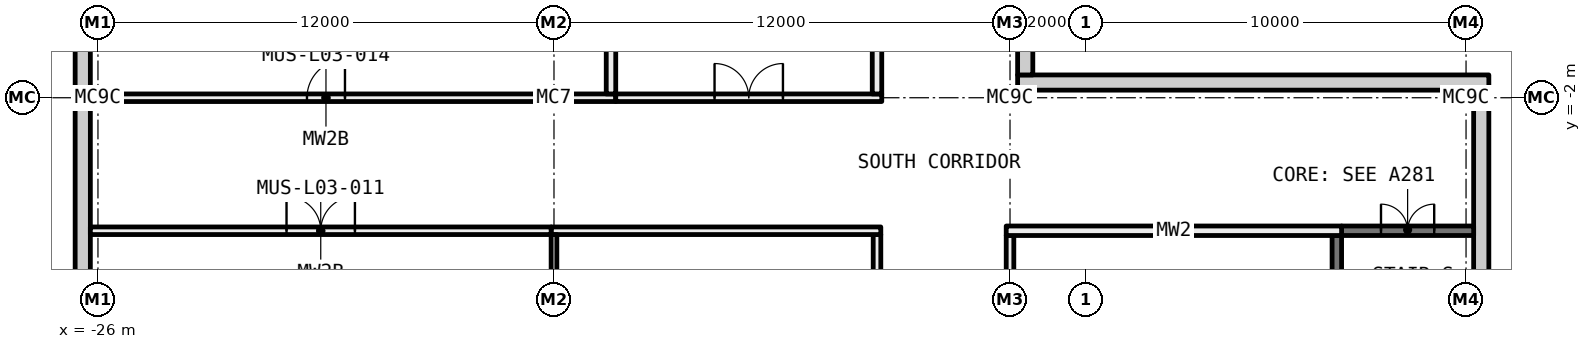
"""IFC4 building model, lengths in metres.
Left out: names, types, materials, properties, quantities, classifications, styles, units other than length and angle.
Written with IfcOpenShell. Run it as: python <this file> out.ifc"""

import sys

from ifc_helpers import new_model, si_unit, direction, frame, frame_2d, origin, origin_2d, place, context, subcontext, project, spatial, rectangle, i_section, extrude, element, fill, save


model = new_model("IFC4")
c1 = context("Model", 3, precision=1e-05, world=origin(), true_north=direction((0.0, 1.0)))
c2 = subcontext(c1, "Body", "Model", "MODEL_VIEW")
j1 = project(units=[si_unit("LENGTHUNIT", "METRE"), si_unit("PLANEANGLEUNIT", "RADIAN")], contexts=[c1])
p1 = place(None, origin())
s1 = spatial("IfcSite", under=j1, at=p1, CompositionType="ELEMENT")
p2 = place(p1, origin())
s2 = spatial("IfcBuilding", under=s1, at=p2, CompositionType="ELEMENT")
p3 = place(p2, frame((0.0, 0.0, 18.0)))
s3 = spatial("IfcBuildingStorey", under=s2, at=p3, CompositionType="ELEMENT", Elevation=18.0)
p4 = place(p3, frame((-26.0, -2.0, 0.0), z_axis=(0.0, 0.0, 1.0), x_axis=(1.0, 0.0, 0.0)))
e1 = element("IfcColumn", 1, at=p4, inside=s3, PredefinedType="COLUMN", context=c2, shape_type="SweptSolid", body=[
    extrude(i_section(OverallWidth=0.4, OverallDepth=0.4, WebThickness=0.013, FlangeThickness=0.021, FilletRadius=0.022, at=origin_2d()), origin(), (0.0, 0.0, 1.0), 5.6),
])
p5 = place(p3, frame((-14.0, -2.0, 0.0), z_axis=(0.0, 0.0, 1.0), x_axis=(1.0, 0.0, 0.0)))
e2 = element("IfcColumn", 2, at=p5, inside=s3, PredefinedType="COLUMN", context=c2, shape_type="SweptSolid", body=[
    extrude(i_section(OverallWidth=0.35, OverallDepth=0.35, WebThickness=0.012, FlangeThickness=0.019, FilletRadius=0.013, at=origin_2d()), origin(), (0.0, 0.0, 1.0), 5.6),
])
for number, where, z_axis, x_axis in (
    (3, (-2.0, -2.0, 0.0), (0.0, 0.0, 1.0), (1.0, 0.0, 0.0)),
    (4, (10.0, -2.0, 0.0), (0.0, 0.0, 1.0), (1.0, 0.0, 0.0)),
):
    element("IfcColumn", number, at=place(p3, frame(where, z_axis=z_axis, x_axis=x_axis)), inside=s3, PredefinedType="COLUMN", context=c2, shape_type="SweptSolid", body=[
        extrude(i_section(OverallWidth=0.4, OverallDepth=0.4, WebThickness=0.013, FlangeThickness=0.021, FilletRadius=0.022, at=origin_2d()), origin(), (0.0, 0.0, 1.0), 5.6),
    ])
p6 = place(p3, frame((-5.5, -14.875, 0.0), z_axis=(0.0, 0.0, 1.0), x_axis=(0.0, 1.0, 0.0)))
e5 = element("IfcWall", 5, at=p6, inside=s3, PredefinedType="PARTITIONING", context=c2, shape_type="SweptSolid", body=[
    extrude(rectangle(XDim=9.275, YDim=0.2, at=frame_2d((4.637, 0.0))), origin(), (0.0, 0.0, 1.0), 5.6),
])
p7 = place(p6, frame((3.738, 0.0, 0.0)))
e6 = element("IfcOpeningElement", 6, at=p7, cuts=e5, PredefinedType="OPENING", context=c2, shape_type="SweptSolid", body=[
    extrude(rectangle(XDim=1.8, YDim=2.1, at=frame_2d((0.9, 1.05))), frame((0.0, 0.11, 0.0), z_axis=(0.0, -1.0, 0.0), x_axis=(1.0, 0.0, 0.0)), (0.0, 0.0, 1.0), 0.22),
])
p8 = place(p3, frame((-14.075, -5.5, 0.0), z_axis=(0.0, 0.0, 1.0), x_axis=(1.0, 0.0, 0.0)))
e7 = element("IfcWall", 7, at=p8, inside=s3, PredefinedType="PARTITIONING", context=c2, shape_type="SweptSolid", body=[
    extrude(rectangle(XDim=8.675, YDim=0.2, at=frame_2d((4.337, 0.0))), origin(), (0.0, 0.0, 1.0), 5.6),
])
p9 = place(p3, frame((-25.8, -2.0, 0.0), z_axis=(0.0, 0.0, 1.0), x_axis=(1.0, 0.0, 0.0)))
e8 = element("IfcWall", 8, at=p9, inside=s3, PredefinedType="PARTITIONING", context=c2, shape_type="SweptSolid", body=[
    extrude(rectangle(XDim=11.6, YDim=0.2, at=frame_2d((5.8, 0.0))), origin(), (0.0, 0.0, 1.0), 5.112),
])
p10 = place(p9, frame((5.3, 0.0, 0.0)))
e9 = element("IfcOpeningElement", 9, at=p10, cuts=e8, PredefinedType="OPENING", context=c2, shape_type="SweptSolid", body=[
    extrude(rectangle(XDim=1.0, YDim=2.1, at=frame_2d((0.5, 1.05))), frame((0.0, 0.11, 0.0), z_axis=(0.0, -1.0, 0.0), x_axis=(1.0, 0.0, 0.0)), (0.0, 0.0, 1.0), 0.22),
])
p11 = place(p3, frame((-13.8, -2.0, 0.0), z_axis=(0.0, 0.0, 1.0), x_axis=(1.0, 0.0, 0.0)))
e10 = element("IfcWall", 10, at=p11, inside=s3, PredefinedType="PARTITIONING", context=c2, shape_type="SweptSolid", body=[
    extrude(rectangle(XDim=1.425, YDim=0.2, at=frame_2d((0.712, 0.0))), origin(), (0.0, 0.0, 1.0), 5.112),
])
p12 = place(p3, frame((-26.2, -5.5, 0.0), z_axis=(0.0, 0.0, 1.0), x_axis=(1.0, 0.0, 0.0)))
e11 = element("IfcWall", 11, at=p12, inside=s3, PredefinedType="PARTITIONING", context=c2, shape_type="SweptSolid", body=[
    extrude(rectangle(XDim=12.125, YDim=0.2, at=frame_2d((6.062, 0.0))), origin(), (0.0, 0.0, 1.0), 5.6),
])
p13 = place(p12, frame((5.162, 0.0, 0.0)))
e12 = element("IfcOpeningElement", 12, at=p13, cuts=e11, PredefinedType="OPENING", context=c2, shape_type="SweptSolid", body=[
    extrude(rectangle(XDim=1.8, YDim=2.1, at=frame_2d((0.9, 1.05))), frame((0.0, 0.11, 0.0), z_axis=(0.0, -1.0, 0.0), x_axis=(1.0, 0.0, 0.0)), (0.0, 0.0, 1.0), 0.22),
])
p14 = place(p3, frame((-12.375, -2.0, 0.0), z_axis=(0.0, 0.0, 1.0), x_axis=(1.0, 0.0, 0.0)))
e13 = element("IfcWall", 13, at=p14, inside=s3, PredefinedType="PARTITIONING", context=c2, shape_type="SweptSolid", body=[
    extrude(rectangle(XDim=7.0, YDim=0.2, at=frame_2d((3.5, 0.0))), origin(), (0.0, 0.0, 1.0), 5.112),
])
p15 = place(p14, frame((2.6, 0.0, 0.0)))
e14 = element("IfcOpeningElement", 14, at=p15, cuts=e13, PredefinedType="OPENING", context=c2, shape_type="SweptSolid", body=[
    extrude(rectangle(XDim=1.8, YDim=2.1, at=frame_2d((0.9, 1.05))), frame((0.0, 0.11, 0.0), z_axis=(0.0, -1.0, 0.0), x_axis=(1.0, 0.0, 0.0)), (0.0, 0.0, 1.0), 0.22),
])
p16 = place(p3, frame((-5.5, -1.9, 0.0), z_axis=(0.0, 0.0, 1.0), x_axis=(0.0, 1.0, 0.0)))
e15 = element("IfcWall", 15, at=p16, inside=s3, PredefinedType="PARTITIONING", context=c2, shape_type="SweptSolid", body=[
    extrude(rectangle(XDim=2.975, YDim=0.25, at=frame_2d((1.487, 0.0))), origin(), (0.0, 0.0, 1.0), 5.6),
])
p17 = place(p3, frame((-2.0, -13.8, 0.0), z_axis=(0.0, 0.0, 1.0), x_axis=(0.0, 1.0, 0.0)))
e16 = element("IfcWall", 16, at=p17, inside=s3, PredefinedType="PARTITIONING", context=c2, shape_type="SweptSolid", body=[
    extrude(rectangle(XDim=8.175, YDim=0.2, at=frame_2d((4.087, 0.0))), origin(), (0.0, 0.0, 1.0), 5.112),
])
p18 = place(p17, frame((3.588, 0.0, 0.0)))
e17 = element("IfcOpeningElement", 17, at=p18, cuts=e16, PredefinedType="OPENING", context=c2, shape_type="SweptSolid", body=[
    extrude(rectangle(XDim=1.0, YDim=2.1, at=frame_2d((0.5, 1.05))), frame((0.0, 0.11, 0.0), z_axis=(0.0, -1.0, 0.0), x_axis=(1.0, 0.0, 0.0)), (0.0, 0.0, 1.0), 0.22),
])
p19 = place(p3, frame((-2.1, -5.5, 0.0), z_axis=(0.0, 0.0, 1.0), x_axis=(1.0, 0.0, 0.0)))
e18 = element("IfcWall", 18, at=p19, inside=s3, PredefinedType="PARTITIONING", context=c2, shape_type="SweptSolid", body=[
    extrude(rectangle(XDim=8.825, YDim=0.25, at=frame_2d((4.413, 0.0))), origin(), (0.0, 0.0, 1.0), 5.6),
])
p20 = place(p3, frame((6.725, -5.5, 0.0), z_axis=(0.0, 0.0, 1.0), x_axis=(1.0, 0.0, 0.0)))
e19 = element("IfcWall", 19, at=p20, inside=s3, PredefinedType="SHEAR", context=c2, shape_type="SweptSolid", body=[
    extrude(rectangle(XDim=3.475, YDim=0.25, at=frame_2d((1.737, 0.0))), origin(), (0.0, 0.0, 1.0), 5.6),
])
p21 = place(p20, frame((1.037, 0.0, 0.0)))
e20 = element("IfcOpeningElement", 20, at=p21, cuts=e19, PredefinedType="OPENING", context=c2, shape_type="SweptSolid", body=[
    extrude(rectangle(XDim=1.4, YDim=2.1, at=frame_2d((0.7, 1.05))), frame((0.0, 0.135, 0.0), z_axis=(0.0, -1.0, 0.0), x_axis=(1.0, 0.0, 0.0)), (0.0, 0.0, 1.0), 0.27),
])
p22 = place(p3, frame((-14.0, -13.8, 0.0), z_axis=(0.0, 0.0, 1.0), x_axis=(0.0, 1.0, 0.0)))
e21 = element("IfcWall", 21, at=p22, inside=s3, PredefinedType="PARTITIONING", context=c2, shape_type="SweptSolid", body=[
    extrude(rectangle(XDim=8.2, YDim=0.15, at=frame_2d((4.1, 0.0))), origin(), (0.0, 0.0, 1.0), 5.112),
])
p23 = place(p3, frame((-12.5, -1.9, 0.0), z_axis=(0.0, 0.0, 1.0), x_axis=(0.0, 1.0, 0.0)))
e22 = element("IfcWall", 22, at=p23, inside=s3, PredefinedType="PARTITIONING", context=c2, shape_type="SweptSolid", body=[
    extrude(rectangle(XDim=2.975, YDim=0.25, at=frame_2d((1.487, 0.0))), origin(), (0.0, 0.0, 1.0), 5.6),
])
p24 = place(p3, frame((6.6, -14.875, 0.0), z_axis=(0.0, 0.0, 1.0), x_axis=(0.0, 1.0, 0.0)))
e23 = element("IfcWall", 23, at=p24, inside=s3, PredefinedType="SHEAR", context=c2, shape_type="SweptSolid", body=[
    extrude(rectangle(XDim=9.25, YDim=0.25, at=frame_2d((4.625, 0.0))), origin(), (0.0, 0.0, 1.0), 5.6),
])
p25 = place(p3, frame((-26.4, -26.2, -0.4), z_axis=(0.0, 0.0, 1.0), x_axis=(0.0, 1.0, 0.0)))
e24 = element("IfcWall", 24, at=p25, inside=s3, PredefinedType="STANDARD", context=c2, shape_type="SweptSolid", body=[
    extrude(rectangle(XDim=72.4, YDim=0.4, at=frame_2d((36.2, 0.0))), origin(), (0.0, 0.0, 1.0), 6.0),
])
p26 = place(p25, frame((27.7, 0.0, 1.3)))
e25 = element("IfcOpeningElement", 25, at=p26, cuts=e24, PredefinedType="OPENING", context=c2, shape_type="SweptSolid", body=[
    extrude(rectangle(XDim=2.0, YDim=3.6, at=frame_2d((1.0, 1.8))), frame((0.0, 0.21, 0.0), z_axis=(0.0, -1.0, 0.0), x_axis=(1.0, 0.0, 0.0)), (0.0, 0.0, 1.0), 0.42),
])
p27 = place(p25, frame((30.7, 0.0, 1.3)))
e26 = element("IfcOpeningElement", 26, at=p27, cuts=e24, PredefinedType="OPENING", context=c2, shape_type="SweptSolid", body=[
    extrude(rectangle(XDim=2.0, YDim=3.6, at=frame_2d((1.0, 1.8))), frame((0.0, 0.21, 0.0), z_axis=(0.0, -1.0, 0.0), x_axis=(1.0, 0.0, 0.0)), (0.0, 0.0, 1.0), 0.42),
])
p28 = place(p25, frame((33.2, 0.0, 1.3)))
e27 = element("IfcOpeningElement", 27, at=p28, cuts=e24, PredefinedType="OPENING", context=c2, shape_type="SweptSolid", body=[
    extrude(rectangle(XDim=2.0, YDim=3.6, at=frame_2d((1.0, 1.8))), frame((0.0, 0.21, 0.0), z_axis=(0.0, -1.0, 0.0), x_axis=(1.0, 0.0, 0.0)), (0.0, 0.0, 1.0), 0.42),
])
p29 = place(p25, frame((39.7, 0.0, 1.3)))
e28 = element("IfcOpeningElement", 28, at=p29, cuts=e24, PredefinedType="OPENING", context=c2, shape_type="SweptSolid", body=[
    extrude(rectangle(XDim=2.0, YDim=3.6, at=frame_2d((1.0, 1.8))), frame((0.0, 0.21, 0.0), z_axis=(0.0, -1.0, 0.0), x_axis=(1.0, 0.0, 0.0)), (0.0, 0.0, 1.0), 0.42),
])
p30 = place(p25, frame((42.7, 0.0, 1.3)))
e29 = element("IfcOpeningElement", 29, at=p30, cuts=e24, PredefinedType="OPENING", context=c2, shape_type="SweptSolid", body=[
    extrude(rectangle(XDim=2.0, YDim=3.6, at=frame_2d((1.0, 1.8))), frame((0.0, 0.21, 0.0), z_axis=(0.0, -1.0, 0.0), x_axis=(1.0, 0.0, 0.0)), (0.0, 0.0, 1.0), 0.42),
])
p31 = place(p25, frame((49.7, 0.0, 1.3)))
e30 = element("IfcOpeningElement", 30, at=p31, cuts=e24, PredefinedType="OPENING", context=c2, shape_type="SweptSolid", body=[
    extrude(rectangle(XDim=2.0, YDim=3.6, at=frame_2d((1.0, 1.8))), frame((0.0, 0.21, 0.0), z_axis=(0.0, -1.0, 0.0), x_axis=(1.0, 0.0, 0.0)), (0.0, 0.0, 1.0), 0.42),
])
p32 = place(p25, frame((53.7, 0.0, 1.3)))
e31 = element("IfcOpeningElement", 31, at=p32, cuts=e24, PredefinedType="OPENING", context=c2, shape_type="SweptSolid", body=[
    extrude(rectangle(XDim=2.0, YDim=3.6, at=frame_2d((1.0, 1.8))), frame((0.0, 0.21, 0.0), z_axis=(0.0, -1.0, 0.0), x_axis=(1.0, 0.0, 0.0)), (0.0, 0.0, 1.0), 0.42),
])
p33 = place(p25, frame((56.7, 0.0, 1.3)))
e32 = element("IfcOpeningElement", 32, at=p33, cuts=e24, PredefinedType="OPENING", context=c2, shape_type="SweptSolid", body=[
    extrude(rectangle(XDim=2.0, YDim=3.6, at=frame_2d((1.0, 1.8))), frame((0.0, 0.21, 0.0), z_axis=(0.0, -1.0, 0.0), x_axis=(1.0, 0.0, 0.0)), (0.0, 0.0, 1.0), 0.42),
])
p34 = place(p25, frame((62.2, 0.0, 1.3)))
e33 = element("IfcOpeningElement", 33, at=p34, cuts=e24, PredefinedType="OPENING", context=c2, shape_type="SweptSolid", body=[
    extrude(rectangle(XDim=2.0, YDim=3.6, at=frame_2d((1.0, 1.8))), frame((0.0, 0.21, 0.0), z_axis=(0.0, -1.0, 0.0), x_axis=(1.0, 0.0, 0.0)), (0.0, 0.0, 1.0), 0.42),
])
p35 = place(p25, frame((65.7, 0.0, 1.3)))
e34 = element("IfcOpeningElement", 34, at=p35, cuts=e24, PredefinedType="OPENING", context=c2, shape_type="SweptSolid", body=[
    extrude(rectangle(XDim=2.0, YDim=3.6, at=frame_2d((1.0, 1.8))), frame((0.0, 0.21, 0.0), z_axis=(0.0, -1.0, 0.0), x_axis=(1.0, 0.0, 0.0)), (0.0, 0.0, 1.0), 0.42),
])
p36 = place(p3, frame((10.4, -15.0, -0.4), z_axis=(0.0, 0.0, 1.0), x_axis=(0.0, 1.0, 0.0)))
e35 = element("IfcWall", 35, at=p36, inside=s3, PredefinedType="STANDARD", context=c2, shape_type="SweptSolid", body=[
    extrude(rectangle(XDim=13.2, YDim=0.4, at=frame_2d((6.6, 0.0))), origin(), (0.0, 0.0, 1.0), 6.0),
])
p37 = place(p3, frame((-1.8, -1.6, -0.4), z_axis=(0.0, 0.0, 1.0), x_axis=(1.0, 0.0, 0.0)))
e36 = element("IfcWall", 36, at=p37, inside=s3, PredefinedType="STANDARD", context=c2, shape_type="SweptSolid", body=[
    extrude(rectangle(XDim=12.4, YDim=0.4, at=frame_2d((6.2, 0.0))), origin(), (0.0, 0.0, 1.0), 6.0),
])
p38 = place(p3, frame((-1.6, -1.4, -0.4), z_axis=(0.0, 0.0, 1.0), x_axis=(0.0, 1.0, 0.0)))
e37 = element("IfcWall", 37, at=p38, inside=s3, PredefinedType="STANDARD", context=c2, shape_type="SweptSolid", body=[
    extrude(rectangle(XDim=47.6, YDim=0.4, at=frame_2d((23.8, 0.0))), origin(), (0.0, 0.0, 1.0), 6.0),
])
p39 = place(p21, origin())
e38 = element("IfcDoor", 38, at=p39, inside=s3, OperationType="DOUBLE_DOOR_SINGLE_SWING", PredefinedType="DOOR", context=c2, shape_type="SweptSolid", body=[
    extrude(rectangle(XDim=1.4, YDim=2.1, at=frame_2d((0.7, 1.05))), frame((0.0, 0.025, 0.0), z_axis=(0.0, -1.0, 0.0), x_axis=(1.0, 0.0, 0.0)), (0.0, 0.0, 1.0), 0.05),
])
fill(e20, e38)
p40 = place(p15, origin())
e39 = element("IfcDoor", 39, at=p40, inside=s3, OperationType="DOUBLE_DOOR_SINGLE_SWING", PredefinedType="DOOR", context=c2, shape_type="SweptSolid", body=[
    extrude(rectangle(XDim=1.8, YDim=2.1, at=frame_2d((0.9, 1.05))), frame((0.0, 0.025, 0.0), z_axis=(0.0, -1.0, 0.0), x_axis=(1.0, 0.0, 0.0)), (0.0, 0.0, 1.0), 0.05),
])
fill(e14, e39)
p41 = place(p13, origin())
e40 = element("IfcDoor", 40, at=p41, inside=s3, OperationType="DOUBLE_DOOR_SINGLE_SWING", PredefinedType="DOOR", context=c2, shape_type="SweptSolid", body=[
    extrude(rectangle(XDim=1.8, YDim=2.1, at=frame_2d((0.9, 1.05))), frame((0.0, 0.025, 0.0), z_axis=(0.0, -1.0, 0.0), x_axis=(1.0, 0.0, 0.0)), (0.0, 0.0, 1.0), 0.05),
])
fill(e12, e40)
p42 = place(p10, origin())
e41 = element("IfcDoor", 41, at=p42, inside=s3, OperationType="SINGLE_SWING_LEFT", PredefinedType="DOOR", context=c2, shape_type="SweptSolid", body=[
    extrude(rectangle(XDim=1.0, YDim=2.1, at=frame_2d((0.5, 1.05))), frame((0.0, 0.025, 0.0), z_axis=(0.0, -1.0, 0.0), x_axis=(1.0, 0.0, 0.0)), (0.0, 0.0, 1.0), 0.05),
])
fill(e9, e41)
save(model, sys.argv[1])
